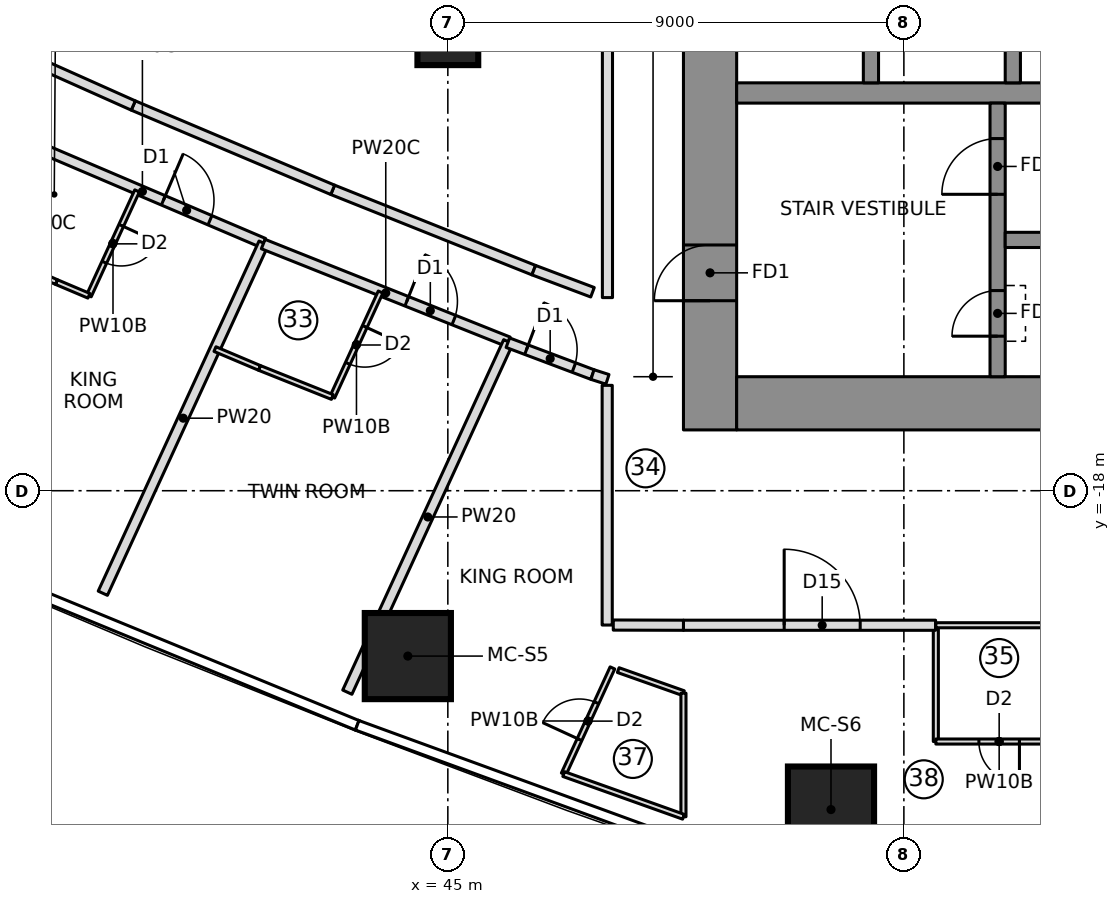
"""IFC4 building model, lengths in metres.
Left out: names, types, materials, properties, quantities, classifications, styles, units other than length and angle.
Written with IfcOpenShell. Run it as: python <this file> out.ifc"""

import sys

from ifc_helpers import new_model, si_unit, direction, frame, frame_2d, origin, origin_2d, place, context, subcontext, project, spatial, rectangle, extrude, element, fill, save


model = new_model("IFC4")
c1 = context("Model", 3, precision=1e-05, world=origin(), true_north=direction((0.0, 1.0)))
c2 = subcontext(c1, "Body", "Model", "MODEL_VIEW")
j1 = project(units=[si_unit("LENGTHUNIT", "METRE"), si_unit("PLANEANGLEUNIT", "RADIAN")], contexts=[c1])
p1 = place(None, origin())
s1 = spatial("IfcSite", under=j1, at=p1, CompositionType="ELEMENT")
p2 = place(p1, origin())
s2 = spatial("IfcBuilding", under=s1, at=p2, CompositionType="ELEMENT")
p3 = place(p2, frame((0.0, 0.0, 116.85)))
s3 = spatial("IfcBuildingStorey", under=s2, at=p3, CompositionType="ELEMENT", Elevation=116.85)
p4 = place(p3, frame((50.175, -16.8, 0.0), z_axis=(0.0, 0.0, 1.0), x_axis=(0.0, 1.0, 0.0)))
e1 = element("IfcWall", 1, at=p4, inside=s3, PredefinedType="SHEAR", context=c2, shape_type="SweptSolid", body=[
    extrude(rectangle(XDim=10.15, YDim=1.05, at=frame_2d((5.075, 0.0))), origin(), (0.0, 0.0, 1.0), 3.55),
])
p5 = place(p4, frame((2.55, 0.0, 0.0)))
e2 = element("IfcOpeningElement", 2, at=p5, cuts=e1, PredefinedType="OPENING", context=c2, shape_type="SweptSolid", body=[
    extrude(rectangle(XDim=1.1, YDim=2.1, at=frame_2d((0.55, 1.05))), frame((0.0, 0.535, 0.0), z_axis=(0.0, -1.0, 0.0), x_axis=(1.0, 0.0, 0.0)), (0.0, 0.0, 1.0), 1.07),
])
p6 = place(p3, frame((50.7, -16.275, 0.0), z_axis=(0.0, 0.0, 1.0), x_axis=(1.0, 0.0, 0.0)))
e3 = element("IfcWall", 3, at=p6, inside=s3, PredefinedType="SHEAR", context=c2, shape_type="SweptSolid", body=[
    extrude(rectangle(XDim=14.07, YDim=1.05, at=frame_2d((7.035, 0.0))), origin(), (0.0, 0.0, 1.0), 3.55),
])
p7 = place(p3, frame((50.7, -10.15, 0.0), z_axis=(0.0, 0.0, 1.0), x_axis=(1.0, 0.0, 0.0)))
e4 = element("IfcWall", 4, at=p7, inside=s3, PredefinedType="SHEAR", context=c2, shape_type="SweptSolid", body=[
    extrude(rectangle(XDim=13.02, YDim=0.4, at=frame_2d((6.51, 0.0))), origin(), (0.0, 0.0, 1.0), 3.55),
])
for number, where, z_axis, x_axis in (
    (5, (53.35, -9.95, 0.0), (0.0, 0.0, 1.0), (0.0, 1.0, 0.0)),
    (6, (56.15, -9.95, 0.0), (0.0, 0.0, 1.0), (0.0, 1.0, 0.0)),
):
    element("IfcWall", number, at=place(p3, frame(where, z_axis=z_axis, x_axis=x_axis)), inside=s3, PredefinedType="SHEAR", context=c2, shape_type="SweptSolid", body=[
        extrude(rectangle(XDim=3.0, YDim=0.3, at=frame_2d((1.5, 0.0))), origin(), (0.0, 0.0, 1.0), 3.55),
    ])
p8 = place(p3, frame((55.85, -15.75, 0.0), z_axis=(0.0, 0.0, 1.0), x_axis=(0.0, 1.0, 0.0)))
e7 = element("IfcWall", 7, at=p8, inside=s3, PredefinedType="SHEAR", context=c2, shape_type="SweptSolid", body=[
    extrude(rectangle(XDim=5.4, YDim=0.3, at=frame_2d((2.7, 0.0))), origin(), (0.0, 0.0, 1.0), 3.55),
])
p9 = place(p8, frame((3.6, 0.0, 0.0)))
e8 = element("IfcOpeningElement", 8, at=p9, cuts=e7, PredefinedType="OPENING", context=c2, shape_type="SweptSolid", body=[
    extrude(rectangle(XDim=1.1, YDim=2.1, at=frame_2d((0.55, 1.05))), frame((0.0, 0.16, 0.0), z_axis=(0.0, -1.0, 0.0), x_axis=(1.0, 0.0, 0.0)), (0.0, 0.0, 1.0), 0.32),
])
p10 = place(p8, frame((0.8, 0.0, 0.0)))
e9 = element("IfcOpeningElement", 9, at=p10, cuts=e7, PredefinedType="OPENING", context=c2, shape_type="SweptSolid", body=[
    extrude(rectangle(XDim=0.9, YDim=2.1, at=frame_2d((0.45, 1.05))), frame((0.0, 0.16, 0.0), z_axis=(0.0, -1.0, 0.0), x_axis=(1.0, 0.0, 0.0)), (0.0, 0.0, 1.0), 0.32),
])
p11 = place(p3, frame((56.0, -13.05, 0.0), z_axis=(0.0, 0.0, 1.0), x_axis=(1.0, 0.0, 0.0)))
e10 = element("IfcWall", 10, at=p11, inside=s3, PredefinedType="SHEAR", context=c2, shape_type="SweptSolid", body=[
    extrude(rectangle(XDim=7.72, YDim=0.3, at=frame_2d((3.86, 0.0))), origin(), (0.0, 0.0, 1.0), 3.55),
])
for number, where, z_axis, x_axis in (
    (11, (44.211, -21.264, 0.0), (0.0, 0.0, 1.0), (1.0, 0.0, 0.0)),
    (12, (52.562, -24.293, 0.0), (0.0, 0.0, 1.0), (1.0, 0.0, 0.0)),
):
    element("IfcColumn", number, at=place(p3, frame(where, z_axis=z_axis, x_axis=x_axis)), inside=s3, PredefinedType="COLUMN", context=c2, shape_type="SweptSolid", body=[
        extrude(rectangle(XDim=1.7, YDim=1.7, at=origin_2d()), origin(), (0.0, 0.0, 1.0), 3.55),
    ])
p12 = place(p3, frame((45.0, -9.0, 0.0), z_axis=(0.0, 0.0, 1.0), x_axis=(1.0, 0.0, 0.0)))
e13 = element("IfcColumn", 13, at=p12, inside=s3, PredefinedType="COLUMN", context=c2, shape_type="SweptSolid", body=[
    extrude(rectangle(XDim=1.2, YDim=1.2, at=origin_2d()), origin(), (0.0, 0.0, 1.0), 3.55),
])
p13 = place(p3, frame((54.631, -22.95, 0.0), z_axis=(0.0, 0.0, 1.0), x_axis=(0.0, 1.0, 0.0)))
e14 = element("IfcWall", 14, at=p13, inside=s3, PredefinedType="PARTITIONING", context=c2, shape_type="SweptSolid", body=[
    extrude(rectangle(XDim=2.3, YDim=0.1, at=frame_2d((1.15, 0.0))), origin(), (0.0, 0.0, 1.0), 3.15),
])
p14 = place(p3, frame((57.131, -22.95, 0.0), z_axis=(0.0, 0.0, 1.0), x_axis=(-1.0, 0.0, 0.0)))
e15 = element("IfcWall", 15, at=p14, inside=s3, PredefinedType="PARTITIONING", context=c2, shape_type="SweptSolid", body=[
    extrude(rectangle(XDim=2.5, YDim=0.1, at=frame_2d((1.25, 0.0))), origin(), (0.0, 0.0, 1.0), 3.15),
])
p15 = place(p14, frame((0.85, 0.0, 0.0)))
e16 = element("IfcOpeningElement", 16, at=p15, cuts=e15, PredefinedType="OPENING", context=c2, shape_type="SweptSolid", body=[
    extrude(rectangle(XDim=0.8, YDim=2.1, at=frame_2d((0.4, 1.05))), frame((0.0, 0.06, 0.0), z_axis=(0.0, -1.0, 0.0), x_axis=(1.0, 0.0, 0.0)), (0.0, 0.0, 1.0), 0.12),
])
p16 = place(p3, frame((36.58, -11.073, 0.0), z_axis=(0.0, 0.0, 1.0), x_axis=(0.919874136955, -0.392213681762, 0.0)))
e17 = element("IfcWall", 17, at=p16, inside=s3, PredefinedType="PARTITIONING", context=c2, shape_type="SweptSolid", body=[
    extrude(rectangle(XDim=5.202, YDim=0.2, at=frame_2d((2.601, 0.0))), origin(), (0.0, 0.0, 1.0), 3.15),
])
p17 = place(p16, frame((3.05, 0.0, 0.0)))
e18 = element("IfcOpeningElement", 18, at=p17, cuts=e17, PredefinedType="OPENING", context=c2, shape_type="SweptSolid", body=[
    extrude(rectangle(XDim=1.0, YDim=2.1, at=frame_2d((0.5, 1.05))), frame((0.0, 0.11, 0.0), z_axis=(0.0, -1.0, 0.0), x_axis=(1.0, 0.0, 0.0)), (0.0, 0.0, 1.0), 0.22),
])
p18 = place(p3, frame((38.867, -12.083, 0.0), z_axis=(0.0, 0.0, 1.0), x_axis=(-0.417433204355, -0.908707609686, 0.0)))
e19 = element("IfcWall", 19, at=p18, inside=s3, PredefinedType="PARTITIONING", context=c2, shape_type="SweptSolid", body=[
    extrude(rectangle(XDim=2.278, YDim=0.1, at=frame_2d((1.139, 0.0))), origin(), (0.0, 0.0, 1.0), 3.15),
])
p19 = place(p18, frame((0.75, 0.0, 0.0)))
e20 = element("IfcOpeningElement", 20, at=p19, cuts=e19, PredefinedType="OPENING", context=c2, shape_type="SweptSolid", body=[
    extrude(rectangle(XDim=0.8, YDim=2.1, at=frame_2d((0.4, 1.05))), frame((0.0, 0.06, 0.0), z_axis=(0.0, -1.0, 0.0), x_axis=(1.0, 0.0, 0.0)), (0.0, 0.0, 1.0), 0.12),
])
p20 = place(p3, frame((37.917, -14.153, 0.0), z_axis=(0.0, 0.0, 1.0), x_axis=(-0.920972104389, 0.389628519153, 0.0)))
e21 = element("IfcWall", 21, at=p20, inside=s3, PredefinedType="PARTITIONING", context=c2, shape_type="SweptSolid", body=[
    extrude(rectangle(XDim=0.694, YDim=0.1, at=frame_2d((0.347, 0.0))), origin(), (0.0, 0.0, 1.0), 3.15),
])
p21 = place(p3, frame((37.277, -13.882, 0.0), z_axis=(0.0, 0.0, 1.0), x_axis=(-0.913023709843, 0.407906490833, 0.0)))
e22 = element("IfcWall", 22, at=p21, inside=s3, PredefinedType="PARTITIONING", context=c2, shape_type="SweptSolid", body=[
    extrude(rectangle(XDim=1.806, YDim=0.1, at=frame_2d((0.903, 0.0))), origin(), (0.0, 0.0, 1.0), 3.15),
])
p22 = place(p3, frame((38.191, -20.023, 0.0), z_axis=(0.0, 0.0, 1.0), x_axis=(0.417416334044, 0.908715359215, 0.0)))
e23 = element("IfcWall", 23, at=p22, inside=s3, PredefinedType="PARTITIONING", context=c2, shape_type="SweptSolid", body=[
    extrude(rectangle(XDim=7.604, YDim=0.2, at=frame_2d((3.802, 0.0))), origin(), (0.0, 0.0, 1.0), 3.15),
])
p23 = place(p3, frame((41.357, -13.132, 0.0), z_axis=(0.0, 0.0, 1.0), x_axis=(0.928902922329, -0.370323319396, 0.0)))
e24 = element("IfcWall", 24, at=p23, inside=s3, PredefinedType="PARTITIONING", context=c2, shape_type="SweptSolid", body=[
    extrude(rectangle(XDim=5.207, YDim=0.2, at=frame_2d((2.604, 0.0))), origin(), (0.0, 0.0, 1.0), 3.15),
])
p24 = place(p23, frame((3.05, 0.0, 0.0)))
e25 = element("IfcOpeningElement", 25, at=p24, cuts=e24, PredefinedType="OPENING", context=c2, shape_type="SweptSolid", body=[
    extrude(rectangle(XDim=1.0, YDim=2.1, at=frame_2d((0.5, 1.05))), frame((0.0, 0.11, 0.0), z_axis=(0.0, -1.0, 0.0), x_axis=(1.0, 0.0, 0.0)), (0.0, 0.0, 1.0), 0.22),
])
p25 = place(p3, frame((43.673, -14.079, 0.0), z_axis=(0.0, 0.0, 1.0), x_axis=(-0.417414140651, -0.908716366742, 0.0)))
e26 = element("IfcWall", 26, at=p25, inside=s3, PredefinedType="PARTITIONING", context=c2, shape_type="SweptSolid", body=[
    extrude(rectangle(XDim=2.28, YDim=0.1, at=frame_2d((1.14, 0.0))), origin(), (0.0, 0.0, 1.0), 3.15),
])
p26 = place(p25, frame((0.75, 0.0, 0.0)))
e27 = element("IfcOpeningElement", 27, at=p26, cuts=e26, PredefinedType="OPENING", context=c2, shape_type="SweptSolid", body=[
    extrude(rectangle(XDim=0.8, YDim=2.1, at=frame_2d((0.4, 1.05))), frame((0.0, 0.06, 0.0), z_axis=(0.0, -1.0, 0.0), x_axis=(1.0, 0.0, 0.0)), (0.0, 0.0, 1.0), 0.12),
])
p27 = place(p3, frame((42.721, -16.151, 0.0), z_axis=(0.0, 0.0, 1.0), x_axis=(-0.928607087251, 0.371064519333, 0.0)))
e28 = element("IfcWall", 28, at=p27, inside=s3, PredefinedType="PARTITIONING", context=c2, shape_type="SweptSolid", body=[
    extrude(rectangle(XDim=1.549, YDim=0.1, at=frame_2d((0.774, 0.0))), origin(), (0.0, 0.0, 1.0), 3.15),
])
p28 = place(p3, frame((41.283, -15.576, 0.0), z_axis=(0.0, 0.0, 1.0), x_axis=(-0.921041449483, 0.389464566212, 0.0)))
e29 = element("IfcWall", 29, at=p28, inside=s3, PredefinedType="PARTITIONING", context=c2, shape_type="SweptSolid", body=[
    extrude(rectangle(XDim=0.953, YDim=0.1, at=frame_2d((0.477, 0.0))), origin(), (0.0, 0.0, 1.0), 3.15),
])
p29 = place(p3, frame((43.016, -21.976, 0.0), z_axis=(0.0, 0.0, 1.0), x_axis=(0.417444332366, 0.908702497727, 0.0)))
e30 = element("IfcWall", 30, at=p29, inside=s3, PredefinedType="PARTITIONING", context=c2, shape_type="SweptSolid", body=[
    extrude(rectangle(XDim=7.611, YDim=0.2, at=frame_2d((3.805, 0.0))), origin(), (0.0, 0.0, 1.0), 3.15),
])
p30 = place(p3, frame((48.363, -21.54, 0.0), z_axis=(0.0, 0.0, 1.0), x_axis=(0.942692856107, -0.333661773425, 0.0)))
e31 = element("IfcWall", 31, at=p30, inside=s3, PredefinedType="PARTITIONING", context=c2, shape_type="SweptSolid", body=[
    extrude(rectangle(XDim=1.365, YDim=0.1, at=frame_2d((0.683, 0.0))), origin(), (0.0, 0.0, 1.0), 3.15),
])
p31 = place(p3, frame((47.286, -23.592, 0.0), z_axis=(0.0, 0.0, 1.0), x_axis=(0.41749308293, 0.908680100864, 0.0)))
e32 = element("IfcWall", 32, at=p31, inside=s3, PredefinedType="PARTITIONING", context=c2, shape_type="SweptSolid", body=[
    extrude(rectangle(XDim=2.306, YDim=0.1, at=frame_2d((1.153, 0.0))), origin(), (0.0, 0.0, 1.0), 3.15),
])
p32 = place(p31, frame((0.75, 0.0, 0.0)))
e33 = element("IfcOpeningElement", 33, at=p32, cuts=e32, PredefinedType="OPENING", context=c2, shape_type="SweptSolid", body=[
    extrude(rectangle(XDim=0.8, YDim=2.1, at=frame_2d((0.4, 1.05))), frame((0.0, 0.06, 0.0), z_axis=(0.0, -1.0, 0.0), x_axis=(1.0, 0.0, 0.0)), (0.0, 0.0, 1.0), 0.12),
])
p33 = place(p3, frame((46.696, -13.647, 0.0), z_axis=(0.0, 0.0, 1.0), x_axis=(-0.928638161177, 0.370986745864, 0.0)))
e34 = element("IfcWall", 34, at=p33, inside=s3, PredefinedType="PARTITIONING", context=c2, shape_type="SweptSolid", body=[
    extrude(rectangle(XDim=4.273, YDim=0.2, at=frame_2d((2.136, 0.0))), origin(), (0.0, 0.0, 1.0), 3.15),
])
p34 = place(p3, frame((42.728, -12.062, 0.0), z_axis=(0.0, 0.0, 1.0), x_axis=(-0.921037415532, 0.389474105929, 0.0)))
e35 = element("IfcWall", 35, at=p34, inside=s3, PredefinedType="PARTITIONING", context=c2, shape_type="SweptSolid", body=[
    extrude(rectangle(XDim=4.273, YDim=0.2, at=frame_2d((2.137, 0.0))), origin(), (0.0, 0.0, 1.0), 3.15),
])
p35 = place(p3, frame((38.792, -10.397, 0.0), z_axis=(0.0, 0.0, 1.0), x_axis=(-0.913030623494, 0.407891015544, 0.0)))
e36 = element("IfcWall", 36, at=p35, inside=s3, PredefinedType="PARTITIONING", context=c2, shape_type="SweptSolid", body=[
    extrude(rectangle(XDim=2.648, YDim=0.2, at=frame_2d((1.324, 0.0))), origin(), (0.0, 0.0, 1.0), 3.15),
])
p36 = place(p3, frame((49.65, -20.655, 0.0), z_axis=(0.0, 0.0, 1.0), x_axis=(1.0, 0.0, 0.0)))
e37 = element("IfcWall", 37, at=p36, inside=s3, PredefinedType="PARTITIONING", context=c2, shape_type="SweptSolid", body=[
    extrude(rectangle(XDim=4.976, YDim=0.2, at=frame_2d((2.488, 0.0))), origin(), (0.0, 0.0, 1.0), 3.15),
])
p37 = place(p36, frame((1.988, 0.0, 0.0)))
e38 = element("IfcOpeningElement", 38, at=p37, cuts=e37, PredefinedType="OPENING", context=c2, shape_type="SweptSolid", body=[
    extrude(rectangle(XDim=1.5, YDim=2.1, at=frame_2d((0.75, 1.05))), frame((0.0, 0.11, 0.0), z_axis=(0.0, -1.0, 0.0), x_axis=(1.0, 0.0, 0.0)), (0.0, 0.0, 1.0), 0.22),
])
p38 = place(p3, frame((54.631, -20.655, 0.0), z_axis=(0.0, 0.0, 1.0), x_axis=(1.0, 0.0, 0.0)))
e39 = element("IfcWall", 39, at=p38, inside=s3, PredefinedType="PARTITIONING", context=c2, shape_type="SweptSolid", body=[
    extrude(rectangle(XDim=2.5, YDim=0.1, at=frame_2d((1.25, 0.0))), origin(), (0.0, 0.0, 1.0), 3.15),
])
p39 = place(p3, frame((49.65, -21.996, 0.0), z_axis=(0.0, 0.0, 1.0), x_axis=(0.0, -1.0, 0.0)))
e40 = element("IfcWall", 40, at=p39, inside=s3, PredefinedType="PARTITIONING", context=c2, shape_type="SweptSolid", body=[
    extrude(rectangle(XDim=2.439, YDim=0.1, at=frame_2d((1.22, 0.0))), origin(), (0.0, 0.0, 1.0), 3.15),
])
p40 = place(p3, frame((49.65, -24.435, 0.0), z_axis=(0.0, 0.0, 1.0), x_axis=(-0.941933231826, 0.335800218555, 0.0)))
e41 = element("IfcWall", 41, at=p40, inside=s3, PredefinedType="PARTITIONING", context=c2, shape_type="SweptSolid", body=[
    extrude(rectangle(XDim=2.51, YDim=0.1, at=frame_2d((1.255, 0.0))), origin(), (0.0, 0.0, 1.0), 3.15),
])
p41 = place(p3, frame((46.185, -15.079, 0.0), z_axis=(0.0, 0.0, 1.0), x_axis=(0.935895556609, -0.352277599513, 0.0)))
e42 = element("IfcWall", 42, at=p41, inside=s3, PredefinedType="PARTITIONING", context=c2, shape_type="SweptSolid", body=[
    extrude(rectangle(XDim=1.785, YDim=0.2, at=frame_2d((0.892, 0.0))), origin(), (0.0, 0.0, 1.0), 3.15),
])
p42 = place(p41, frame((0.392, 0.0, 0.0)))
e43 = element("IfcOpeningElement", 43, at=p42, cuts=e42, PredefinedType="OPENING", context=c2, shape_type="SweptSolid", body=[
    extrude(rectangle(XDim=1.0, YDim=2.1, at=frame_2d((0.5, 1.05))), frame((0.0, 0.11, 0.0), z_axis=(0.0, -1.0, 0.0), x_axis=(1.0, 0.0, 0.0)), (0.0, 0.0, 1.0), 0.22),
])
p43 = place(p3, frame((47.855, -14.083, 0.0), z_axis=(0.0, 0.0, 1.0), x_axis=(-0.935907269358, 0.352246480696, 0.0)))
e44 = element("IfcWall", 44, at=p43, inside=s3, PredefinedType="PARTITIONING", context=c2, shape_type="SweptSolid", body=[
    extrude(rectangle(XDim=1.239, YDim=0.2, at=frame_2d((0.619, 0.0))), origin(), (0.0, 0.0, 1.0), 3.15),
])
p44 = place(p3, frame((48.15, 14.189, 0.0), z_axis=(0.0, 0.0, 1.0), x_axis=(0.0, -1.0, 0.0)))
e45 = element("IfcWall", 45, at=p44, inside=s3, PredefinedType="PARTITIONING", context=c2, shape_type="SweptSolid", body=[
    extrude(rectangle(XDim=28.377, YDim=0.2, at=frame_2d((14.189, 0.0))), origin(), (0.0, 0.0, 1.0), 3.15),
])
p45 = place(p3, frame((47.855, -15.707, 0.0), z_axis=(0.0, 0.0, 1.0), x_axis=(0.952167766291, -0.305575759571, 0.0)))
e46 = element("IfcWall", 46, at=p45, inside=s3, PredefinedType="PARTITIONING", context=c2, shape_type="SweptSolid", body=[
    extrude(rectangle(XDim=0.31, YDim=0.2, at=frame_2d((0.155, 0.0))), origin(), (0.0, 0.0, 1.0), 3.15),
])
p46 = place(p3, frame((48.145, -15.92, 0.0), z_axis=(0.0, 0.0, 1.0), x_axis=(-5.1610239e-05, -0.999999998668, 0.0)))
e47 = element("IfcWall", 47, at=p46, inside=s3, PredefinedType="PARTITIONING", context=c2, shape_type="SweptSolid", body=[
    extrude(rectangle(XDim=4.73, YDim=0.2, at=frame_2d((2.365, 0.0))), origin(), (0.0, 0.0, 1.0), 3.15),
])
p47 = place(p3, frame((48.265, -20.651, 0.0), z_axis=(0.0, 0.0, 1.0), x_axis=(0.999996503144, -0.002644560569, 0.0)))
e48 = element("IfcWall", 48, at=p47, inside=s3, PredefinedType="PARTITIONING", context=c2, shape_type="SweptSolid", body=[
    extrude(rectangle(XDim=1.385, YDim=0.2, at=frame_2d((0.692, 0.0))), origin(), (0.0, 0.0, 1.0), 3.15),
])
p48 = place(p15, origin())
e49 = element("IfcDoor", 49, at=p48, inside=s3, OperationType="SINGLE_SWING_LEFT", PredefinedType="DOOR", context=c2, shape_type="SweptSolid", body=[
    extrude(rectangle(XDim=0.8, YDim=2.1, at=frame_2d((0.4, 1.05))), frame((0.0, 0.025, 0.0), z_axis=(0.0, -1.0, 0.0), x_axis=(1.0, 0.0, 0.0)), (0.0, 0.0, 1.0), 0.05),
])
fill(e16, e49)
p49 = place(p19, origin())
e50 = element("IfcDoor", 50, at=p49, inside=s3, OperationType="SINGLE_SWING_LEFT", PredefinedType="DOOR", context=c2, shape_type="SweptSolid", body=[
    extrude(rectangle(XDim=0.8, YDim=2.1, at=frame_2d((0.4, 1.05))), frame((0.0, 0.025, 0.0), z_axis=(0.0, -1.0, 0.0), x_axis=(1.0, 0.0, 0.0)), (0.0, 0.0, 1.0), 0.05),
])
fill(e20, e50)
p50 = place(p17, origin())
e51 = element("IfcDoor", 51, at=p50, inside=s3, OperationType="SINGLE_SWING_LEFT", PredefinedType="DOOR", context=c2, shape_type="SweptSolid", body=[
    extrude(rectangle(XDim=1.0, YDim=2.1, at=frame_2d((0.5, 1.05))), frame((0.0, 0.025, 0.0), z_axis=(0.0, -1.0, 0.0), x_axis=(1.0, 0.0, 0.0)), (0.0, 0.0, 1.0), 0.05),
])
fill(e18, e51)
p51 = place(p26, origin())
e52 = element("IfcDoor", 52, at=p51, inside=s3, OperationType="SINGLE_SWING_LEFT", PredefinedType="DOOR", context=c2, shape_type="SweptSolid", body=[
    extrude(rectangle(XDim=0.8, YDim=2.1, at=frame_2d((0.4, 1.05))), frame((0.0, 0.025, 0.0), z_axis=(0.0, -1.0, 0.0), x_axis=(1.0, 0.0, 0.0)), (0.0, 0.0, 1.0), 0.05),
])
fill(e27, e52)
p52 = place(p24, origin())
e53 = element("IfcDoor", 53, at=p52, inside=s3, OperationType="SINGLE_SWING_LEFT", PredefinedType="DOOR", context=c2, shape_type="SweptSolid", body=[
    extrude(rectangle(XDim=1.0, YDim=2.1, at=frame_2d((0.5, 1.05))), frame((0.0, 0.025, 0.0), z_axis=(0.0, -1.0, 0.0), x_axis=(1.0, 0.0, 0.0)), (0.0, 0.0, 1.0), 0.05),
])
fill(e25, e53)
p53 = place(p32, origin())
e54 = element("IfcDoor", 54, at=p53, inside=s3, OperationType="SINGLE_SWING_LEFT", PredefinedType="DOOR", context=c2, shape_type="SweptSolid", body=[
    extrude(rectangle(XDim=0.8, YDim=2.1, at=frame_2d((0.4, 1.05))), frame((0.0, 0.025, 0.0), z_axis=(0.0, -1.0, 0.0), x_axis=(1.0, 0.0, 0.0)), (0.0, 0.0, 1.0), 0.05),
])
fill(e33, e54)
p54 = place(p42, origin())
e55 = element("IfcDoor", 55, at=p54, inside=s3, OperationType="SINGLE_SWING_LEFT", PredefinedType="DOOR", context=c2, shape_type="SweptSolid", body=[
    extrude(rectangle(XDim=1.0, YDim=2.1, at=frame_2d((0.5, 1.05))), frame((0.0, 0.025, 0.0), z_axis=(0.0, -1.0, 0.0), x_axis=(1.0, 0.0, 0.0)), (0.0, 0.0, 1.0), 0.05),
])
fill(e43, e55)
p55 = place(p37, origin())
e56 = element("IfcDoor", 56, at=p55, inside=s3, OperationType="DOUBLE_DOOR_SINGLE_SWING", PredefinedType="DOOR", context=c2, shape_type="SweptSolid", body=[
    extrude(rectangle(XDim=1.5, YDim=2.1, at=frame_2d((0.75, 1.05))), frame((0.0, 0.025, 0.0), z_axis=(0.0, -1.0, 0.0), x_axis=(1.0, 0.0, 0.0)), (0.0, 0.0, 1.0), 0.05),
])
fill(e38, e56)
p56 = place(p9, origin())
e57 = element("IfcDoor", 57, at=p56, inside=s3, OperationType="SINGLE_SWING_RIGHT", PredefinedType="DOOR", context=c2, shape_type="SweptSolid", body=[
    extrude(rectangle(XDim=1.1, YDim=2.1, at=frame_2d((0.55, 1.05))), frame((0.0, 0.025, 0.0), z_axis=(0.0, -1.0, 0.0), x_axis=(1.0, 0.0, 0.0)), (0.0, 0.0, 1.0), 0.05),
])
fill(e8, e57)
p57 = place(p5, origin())
e58 = element("IfcDoor", 58, at=p57, inside=s3, OperationType="SINGLE_SWING_RIGHT", PredefinedType="DOOR", context=c2, shape_type="SweptSolid", body=[
    extrude(rectangle(XDim=1.1, YDim=2.1, at=frame_2d((0.55, 1.05))), frame((0.0, 0.025, 0.0), z_axis=(0.0, -1.0, 0.0), x_axis=(1.0, 0.0, 0.0)), (0.0, 0.0, 1.0), 0.05),
])
fill(e2, e58)
p58 = place(p10, origin())
e59 = element("IfcDoor", 59, at=p58, inside=s3, OperationType="SINGLE_SWING_LEFT", PredefinedType="DOOR", context=c2, shape_type="SweptSolid", body=[
    extrude(rectangle(XDim=0.9, YDim=2.1, at=frame_2d((0.45, 1.05))), frame((0.0, 0.025, 0.0), z_axis=(0.0, -1.0, 0.0), x_axis=(1.0, 0.0, 0.0)), (0.0, 0.0, 1.0), 0.05),
])
fill(e9, e59)
save(model, sys.argv[1])
